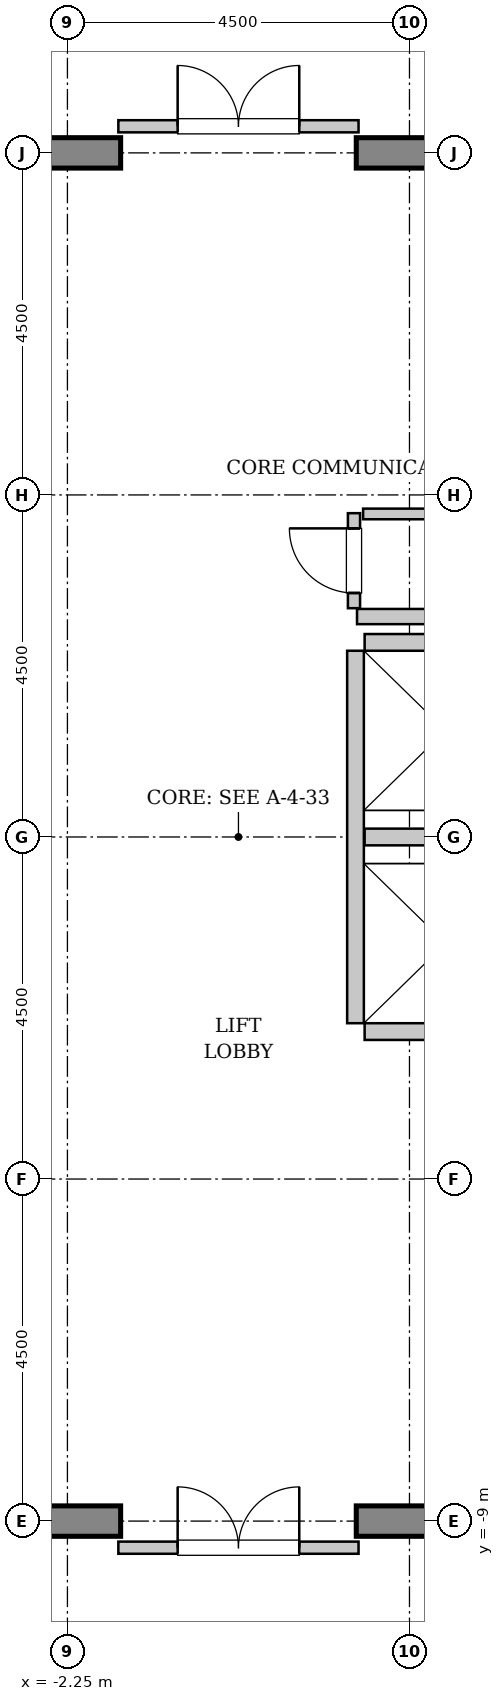
"""IFC4 building model, lengths in metres.
Left out: names, types, materials, properties, quantities, classifications, styles, units other than length and angle.
Written with IfcOpenShell. Run it as: python <this file> out.ifc"""

import sys

from ifc_helpers import new_model, si_unit, direction, frame, frame_2d, origin, place, context, subcontext, project, spatial, rectangle, extrude, source, transform, mapped, element, fill, save


model = new_model("IFC4")
c1 = context("Model", 3, precision=1e-05, world=origin(), true_north=direction((0.0, 1.0)))
c2 = subcontext(c1, "Body", "Model", "MODEL_VIEW")
j1 = project(units=[si_unit("LENGTHUNIT", "METRE"), si_unit("PLANEANGLEUNIT", "RADIAN")], contexts=[c1])
p1 = place(None, origin())
s1 = spatial("IfcSite", under=j1, at=p1, CompositionType="ELEMENT")
p2 = place(p1, origin())
s2 = spatial("IfcBuilding", under=s1, at=p2, CompositionType="ELEMENT")
p3 = place(p2, frame((0.0, 0.0, 358.6)))
s3 = spatial("IfcBuildingStorey", under=s2, at=p3, CompositionType="ELEMENT", Elevation=358.6)
m1 = source(origin(), c2, "Body", "SweptSolid", [
    extrude(rectangle(XDim=9.9, YDim=0.4, at=frame_2d((4.95, 0.0))), origin(), (0.0, 0.0, 1.0), 4.4),
])
for number, where, z_axis, x_axis in (
    (1, (-11.45, 9.0, 0.0), (0.0, 0.0, 1.0), (1.0, 0.0, 0.0)),
    (2, (1.55, 9.0, 0.0), (0.0, 0.0, 1.0), (1.0, 0.0, 0.0)),
    (3, (-11.45, -9.0, 0.0), (0.0, 0.0, 1.0), (1.0, 0.0, 0.0)),
    (4, (1.55, -9.0, 0.0), (0.0, 0.0, 1.0), (1.0, 0.0, 0.0)),
):
    element("IfcWall", number, at=place(p3, frame(where, z_axis=z_axis, x_axis=x_axis)), inside=s3, PredefinedType="SHEAR", context=c2, shape_type="MappedRepresentation", body=[
        mapped(m1, transform((0.0, 0.0, 0.0), x_axis=(1.0, 0.0, 0.0), y_axis=(0.0, 1.0, 0.0), z_axis=(0.0, 0.0, 1.0), scale=1.0)),
    ])
m2 = source(origin(), c2, "Body", "SweptSolid", [
    extrude(rectangle(XDim=4.9, YDim=0.22, at=frame_2d((2.45, 0.0))), origin(), (0.0, 0.0, 1.0), 4.085),
])
p4 = place(p3, frame((1.54, 2.45, 0.0), z_axis=(0.0, 0.0, 1.0), x_axis=(0.0, -1.0, 0.0)))
e5 = element("IfcWall", 5, at=p4, inside=s3, PredefinedType="SOLIDWALL", context=c2, shape_type="MappedRepresentation", body=[
    mapped(m2, transform((0.0, 0.0, 0.0), x_axis=(1.0, 0.0, 0.0), y_axis=(0.0, 1.0, 0.0), z_axis=(0.0, 0.0, 1.0), scale=1.0)),
])
m3 = source(origin(), c2, "Body", "SweptSolid", [
    extrude(rectangle(XDim=2.13, YDim=0.22, at=frame_2d((1.065, 0.0))), origin(), (0.0, 0.0, 1.0), 4.085),
])
for number, where, z_axis, x_axis in (
    (6, (1.66, -2.56, 0.0), (0.0, 0.0, 1.0), (1.0, 0.0, 0.0)),
    (7, (1.66, 0.0, 0.0), (0.0, 0.0, 1.0), (1.0, 0.0, 0.0)),
    (8, (3.79, 2.56, 0.0), (0.0, 0.0, 1.0), (-1.0, 0.0, 0.0)),
):
    element("IfcWall", number, at=place(p3, frame(where, z_axis=z_axis, x_axis=x_axis)), inside=s3, PredefinedType="SOLIDWALL", context=c2, shape_type="MappedRepresentation", body=[
        mapped(m3, transform((0.0, 0.0, 0.0), x_axis=(1.0, 0.0, 0.0), y_axis=(0.0, 1.0, 0.0), z_axis=(0.0, 0.0, 1.0), scale=1.0)),
    ])
m4 = source(origin(), c2, "Body", "SweptSolid", [
    extrude(rectangle(XDim=2.52, YDim=0.2, at=frame_2d((1.26, 0.0))), origin(), (0.0, 0.0, 1.0), 4.085),
])
p5 = place(p3, frame((1.56, 2.9, 0.0), z_axis=(0.0, 0.0, 1.0), x_axis=(1.0, 0.0, 0.0)))
e9 = element("IfcWall", 9, at=p5, inside=s3, PredefinedType="PARTITIONING", context=c2, shape_type="MappedRepresentation", body=[
    mapped(m4, transform((0.0, 0.0, 0.0), x_axis=(1.0, 0.0, 0.0), y_axis=(0.0, 1.0, 0.0), z_axis=(0.0, 0.0, 1.0), scale=1.0)),
])
m5 = source(origin(), c2, "Body", "SweptSolid", [
    extrude(rectangle(XDim=3.16, YDim=0.16, at=frame_2d((1.58, 0.0))), origin(), (0.0, 0.0, 1.0), 3.175),
])
p6 = place(p3, frame((-1.58, 9.35, 0.0), z_axis=(0.0, 0.0, 1.0), x_axis=(1.0, 0.0, 0.0)))
e10 = element("IfcWall", 10, at=p6, inside=s3, PredefinedType="PARTITIONING", context=c2, shape_type="MappedRepresentation", body=[
    mapped(m5, transform((0.0, 0.0, 0.0), x_axis=(1.0, 0.0, 0.0), y_axis=(0.0, 1.0, 0.0), z_axis=(0.0, 0.0, 1.0), scale=1.0)),
])
p7 = place(p6, frame((0.78, 0.0, 0.0)))
e11 = element("IfcOpeningElement", 11, at=p7, cuts=e10, PredefinedType="OPENING", context=c2, shape_type="SweptSolid", body=[
    extrude(rectangle(XDim=1.6, YDim=2.3, at=frame_2d((0.8, 1.15))), frame((0.0, 0.09, 0.0), z_axis=(0.0, -1.0, 0.0), x_axis=(1.0, 0.0, 0.0)), (0.0, 0.0, 1.0), 0.18),
])
p8 = place(p3, frame((-1.58, -9.35, 0.0), z_axis=(0.0, 0.0, 1.0), x_axis=(1.0, 0.0, 0.0)))
e12 = element("IfcWall", 12, at=p8, inside=s3, PredefinedType="PARTITIONING", context=c2, shape_type="MappedRepresentation", body=[
    mapped(m5, transform((0.0, 0.0, 0.0), x_axis=(1.0, 0.0, 0.0), y_axis=(0.0, 1.0, 0.0), z_axis=(0.0, 0.0, 1.0), scale=1.0)),
])
p9 = place(p8, frame((0.78, 0.0, 0.0)))
e13 = element("IfcOpeningElement", 13, at=p9, cuts=e12, PredefinedType="OPENING", context=c2, shape_type="SweptSolid", body=[
    extrude(rectangle(XDim=1.6, YDim=2.3, at=frame_2d((0.8, 1.15))), frame((0.0, 0.09, 0.0), z_axis=(0.0, -1.0, 0.0), x_axis=(1.0, 0.0, 0.0)), (0.0, 0.0, 1.0), 0.18),
])
m6 = source(origin(), c2, "Body", "SweptSolid", [
    extrude(rectangle(XDim=1.25, YDim=0.16, at=frame_2d((0.625, 0.0))), origin(), (0.0, 0.0, 1.0), 4.085),
])
p10 = place(p3, frame((1.52, 3.01, 0.0), z_axis=(0.0, 0.0, 1.0), x_axis=(0.0, 1.0, 0.0)))
e14 = element("IfcWall", 14, at=p10, inside=s3, PredefinedType="PARTITIONING", context=c2, shape_type="MappedRepresentation", body=[
    mapped(m6, transform((0.0, 0.0, 0.0), x_axis=(1.0, 0.0, 0.0), y_axis=(0.0, 1.0, 0.0), z_axis=(0.0, 0.0, 1.0), scale=1.0)),
])
p11 = place(p10, frame((0.2, 0.0, 0.0)))
e15 = element("IfcOpeningElement", 15, at=p11, cuts=e14, PredefinedType="OPENING", context=c2, shape_type="SweptSolid", body=[
    extrude(rectangle(XDim=0.85, YDim=2.1, at=frame_2d((0.425, 1.05))), frame((0.0, 0.09, 0.0), z_axis=(0.0, -1.0, 0.0), x_axis=(1.0, 0.0, 0.0)), (0.0, 0.0, 1.0), 0.18),
])
m7 = source(origin(), c2, "Body", "SweptSolid", [
    extrude(rectangle(XDim=3.15, YDim=0.14, at=frame_2d((1.575, 0.0))), origin(), (0.0, 0.0, 1.0), 4.085),
])
p12 = place(p3, frame((1.64, 4.25, 0.0), z_axis=(0.0, 0.0, 1.0), x_axis=(1.0, 0.0, 0.0)))
e16 = element("IfcWall", 16, at=p12, inside=s3, PredefinedType="PARTITIONING", context=c2, shape_type="MappedRepresentation", body=[
    mapped(m7, transform((0.0, 0.0, 0.0), x_axis=(1.0, 0.0, 0.0), y_axis=(0.0, 1.0, 0.0), z_axis=(0.0, 0.0, 1.0), scale=1.0)),
])
m8 = source(origin(), c2, "Body", "SweptSolid", [
    extrude(rectangle(XDim=1.6, YDim=2.3, at=frame_2d((0.8, 1.15))), frame((0.0, 0.025, 0.0), z_axis=(0.0, -1.0, 0.0), x_axis=(1.0, 0.0, 0.0)), (0.0, 0.0, 1.0), 0.05),
])
p13 = place(p7, origin())
e17 = element("IfcDoor", 17, at=p13, inside=s3, OperationType="DOUBLE_DOOR_SINGLE_SWING", PredefinedType="DOOR", context=c2, shape_type="MappedRepresentation", body=[
    mapped(m8, transform((0.0, 0.0, 0.0), x_axis=(1.0, 0.0, 0.0), y_axis=(0.0, 1.0, 0.0), z_axis=(0.0, 0.0, 1.0), scale=1.0)),
])
fill(e11, e17)
p14 = place(p9, origin())
e18 = element("IfcDoor", 18, at=p14, inside=s3, OperationType="DOUBLE_DOOR_SINGLE_SWING", PredefinedType="DOOR", context=c2, shape_type="MappedRepresentation", body=[
    mapped(m8, transform((0.0, 0.0, 0.0), x_axis=(1.0, 0.0, 0.0), y_axis=(0.0, 1.0, 0.0), z_axis=(0.0, 0.0, 1.0), scale=1.0)),
])
fill(e13, e18)
m9 = source(origin(), c2, "Body", "SweptSolid", [
    extrude(rectangle(XDim=0.85, YDim=2.1, at=frame_2d((0.425, 1.05))), frame((0.0, 0.025, 0.0), z_axis=(0.0, -1.0, 0.0), x_axis=(1.0, 0.0, 0.0)), (0.0, 0.0, 1.0), 0.05),
])
p15 = place(p11, origin())
e19 = element("IfcDoor", 19, at=p15, inside=s3, OperationType="SINGLE_SWING_RIGHT", PredefinedType="DOOR", context=c2, shape_type="MappedRepresentation", body=[
    mapped(m9, transform((0.0, 0.0, 0.0), x_axis=(1.0, 0.0, 0.0), y_axis=(0.0, 1.0, 0.0), z_axis=(0.0, 0.0, 1.0), scale=1.0)),
])
fill(e15, e19)
save(model, sys.argv[1])
